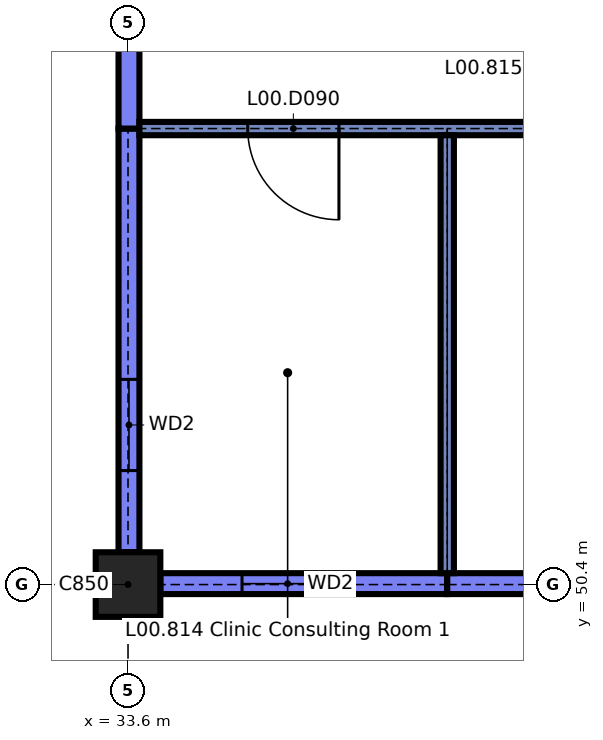
"""IFC4 building model, lengths in metres.
Left out: names, types, materials, properties, quantities, classifications, styles, units other than length and angle.
Written with IfcOpenShell. Run it as: python <this file> out.ifc"""

import sys

from ifc_helpers import new_model, si_unit, direction, frame, frame_2d, origin, origin_2d, place, context, subcontext, project, spatial, rectangle, extrude, element, fill, save


model = new_model("IFC4")
c1 = context("Model", 3, precision=1e-05, world=origin(), true_north=direction((0.0, 1.0)))
c2 = subcontext(c1, "Body", "Model", "MODEL_VIEW")
j1 = project(units=[si_unit("LENGTHUNIT", "METRE"), si_unit("PLANEANGLEUNIT", "RADIAN")], contexts=[c1])
p1 = place(None, origin())
s1 = spatial("IfcSite", under=j1, at=p1, CompositionType="ELEMENT")
p2 = place(p1, origin())
s2 = spatial("IfcBuilding", under=s1, at=p2, CompositionType="ELEMENT")
p3 = place(p2, origin())
s3 = spatial("IfcBuildingStorey", under=s2, at=p3, CompositionType="ELEMENT", Elevation=0.0)
p4 = place(p3, frame((33.6, 50.4, 0.0), z_axis=(0.0, 0.0, 1.0), x_axis=(1.0, 0.0, 0.0)))
e1 = element("IfcColumn", 1, at=p4, inside=s3, PredefinedType="COLUMN", context=c2, shape_type="SweptSolid", body=[
    extrude(rectangle(XDim=0.85, YDim=0.85, at=origin_2d()), origin(), (0.0, 0.0, 1.0), 4.14),
])
p5 = place(p3, frame((34.025, 50.413, 0.0), z_axis=(0.0, 0.0, 1.0), x_axis=(1.0, 0.0, 0.0)))
e2 = element("IfcWall", 2, at=p5, inside=s3, PredefinedType="SOLIDWALL", context=c2, shape_type="SweptSolid", body=[
    extrude(rectangle(XDim=3.775, YDim=0.275, at=frame_2d((1.888, 0.0))), origin(), (0.0, 0.0, 1.0), 3.84),
])
p6 = place(p5, frame((1.075, 0.0, 0.9)))
e3 = element("IfcOpeningElement", 3, at=p6, cuts=e2, PredefinedType="OPENING", context=c2, shape_type="SweptSolid", body=[
    extrude(rectangle(XDim=1.2, YDim=2.1, at=frame_2d((0.6, 1.05))), frame((0.0, 0.147, 0.0), z_axis=(0.0, -1.0, 0.0), x_axis=(1.0, 0.0, 0.0)), (0.0, 0.0, 1.0), 0.295),
])
p7 = place(p3, frame((37.8, 50.413, 0.0), z_axis=(0.0, 0.0, 1.0), x_axis=(1.0, 0.0, 0.0)))
e4 = element("IfcWall", 4, at=p7, inside=s3, PredefinedType="SOLIDWALL", context=c2, shape_type="SweptSolid", body=[
    extrude(rectangle(XDim=3.775, YDim=0.275, at=frame_2d((1.887, 0.0))), origin(), (0.0, 0.0, 1.0), 3.84),
])
p8 = place(p7, frame((1.5, 0.0, 0.9)))
e5 = element("IfcOpeningElement", 5, at=p8, cuts=e4, PredefinedType="OPENING", context=c2, shape_type="SweptSolid", body=[
    extrude(rectangle(XDim=1.2, YDim=2.1, at=frame_2d((0.6, 1.05))), frame((0.0, 0.147, 0.0), z_axis=(0.0, -1.0, 0.0), x_axis=(1.0, 0.0, 0.0)), (0.0, 0.0, 1.0), 0.295),
])
p9 = place(p3, frame((33.613, 50.825, 0.0), z_axis=(0.0, 0.0, 1.0), x_axis=(0.0, 1.0, 0.0)))
e6 = element("IfcWall", 6, at=p9, inside=s3, PredefinedType="SOLIDWALL", context=c2, shape_type="SweptSolid", body=[
    extrude(rectangle(XDim=5.575, YDim=0.275, at=frame_2d((2.788, 0.0))), origin(), (0.0, 0.0, 1.0), 3.84),
])
p10 = place(p9, frame((1.075, 0.0, 0.9)))
e7 = element("IfcOpeningElement", 7, at=p10, cuts=e6, PredefinedType="OPENING", context=c2, shape_type="SweptSolid", body=[
    extrude(rectangle(XDim=1.2, YDim=2.1, at=frame_2d((0.6, 1.05))), frame((0.0, 0.147, 0.0), z_axis=(0.0, -1.0, 0.0), x_axis=(1.0, 0.0, 0.0)), (0.0, 0.0, 1.0), 0.295),
])
p11 = place(p3, frame((33.613, 56.4, 0.0), z_axis=(0.0, 0.0, 1.0), x_axis=(0.0, 1.0, 0.0)))
e8 = element("IfcWall", 8, at=p11, inside=s3, PredefinedType="SOLIDWALL", context=c2, shape_type="SweptSolid", body=[
    extrude(rectangle(XDim=1.975, YDim=0.275, at=frame_2d((0.988, 0.0))), origin(), (0.0, 0.0, 1.0), 3.84),
])
p12 = place(p3, frame((33.75, 56.4, 0.0), z_axis=(0.0, 0.0, 1.0), x_axis=(1.0, 0.0, 0.0)))
e9 = element("IfcWall", 9, at=p12, inside=s3, PredefinedType="PARTITIONING", context=c2, shape_type="SweptSolid", body=[
    extrude(rectangle(XDim=16.65, YDim=0.175, at=frame_2d((8.325, 0.0))), origin(), (0.0, 0.0, 1.0), 4.14),
])
p13 = place(p12, frame((1.425, 0.0, 0.0)))
e10 = element("IfcOpeningElement", 10, at=p13, cuts=e9, PredefinedType="OPENING", context=c2, shape_type="SweptSolid", body=[
    extrude(rectangle(XDim=1.2, YDim=2.1, at=frame_2d((0.6, 1.05))), frame((0.0, 0.097, 0.0), z_axis=(0.0, -1.0, 0.0), x_axis=(1.0, 0.0, 0.0)), (0.0, 0.0, 1.0), 0.195),
])
p14 = place(p12, frame((5.55, 0.0, 0.0)))
e11 = element("IfcOpeningElement", 11, at=p14, cuts=e9, PredefinedType="OPENING", context=c2, shape_type="SweptSolid", body=[
    extrude(rectangle(XDim=1.2, YDim=2.1, at=frame_2d((0.6, 1.05))), frame((0.0, 0.097, 0.0), z_axis=(0.0, -1.0, 0.0), x_axis=(1.0, 0.0, 0.0)), (0.0, 0.0, 1.0), 0.195),
])
p15 = place(p12, frame((9.75, 0.0, 0.0)))
e12 = element("IfcOpeningElement", 12, at=p15, cuts=e9, PredefinedType="OPENING", context=c2, shape_type="SweptSolid", body=[
    extrude(rectangle(XDim=1.2, YDim=2.1, at=frame_2d((0.6, 1.05))), frame((0.0, 0.097, 0.0), z_axis=(0.0, -1.0, 0.0), x_axis=(1.0, 0.0, 0.0)), (0.0, 0.0, 1.0), 0.195),
])
p16 = place(p12, frame((13.95, 0.0, 0.0)))
e13 = element("IfcOpeningElement", 13, at=p16, cuts=e9, PredefinedType="OPENING", context=c2, shape_type="SweptSolid", body=[
    extrude(rectangle(XDim=1.2, YDim=2.1, at=frame_2d((0.6, 1.05))), frame((0.0, 0.097, 0.0), z_axis=(0.0, -1.0, 0.0), x_axis=(1.0, 0.0, 0.0)), (0.0, 0.0, 1.0), 0.195),
])
p17 = place(p3, frame((37.8, 50.55, 0.0), z_axis=(0.0, 0.0, 1.0), x_axis=(0.0, 1.0, 0.0)))
e14 = element("IfcWall", 14, at=p17, inside=s3, PredefinedType="PARTITIONING", context=c2, shape_type="SweptSolid", body=[
    extrude(rectangle(XDim=5.762, YDim=0.175, at=frame_2d((2.881, 0.0))), origin(), (0.0, 0.0, 1.0), 4.14),
])
p18 = place(p6, origin())
e15 = element("IfcWindow", 15, at=p18, inside=s3, PartitioningType="SINGLE_PANEL", PredefinedType="WINDOW", context=c2, shape_type="SweptSolid", body=[
    extrude(rectangle(XDim=1.2, YDim=2.1, at=frame_2d((0.6, 1.05))), frame((0.0, 0.03, 0.0), z_axis=(0.0, -1.0, 0.0), x_axis=(1.0, 0.0, 0.0)), (0.0, 0.0, 1.0), 0.06),
])
fill(e3, e15)
p19 = place(p10, origin())
e16 = element("IfcWindow", 16, at=p19, inside=s3, PartitioningType="SINGLE_PANEL", PredefinedType="WINDOW", context=c2, shape_type="SweptSolid", body=[
    extrude(rectangle(XDim=1.2, YDim=2.1, at=frame_2d((0.6, 1.05))), frame((0.0, 0.03, 0.0), z_axis=(0.0, -1.0, 0.0), x_axis=(1.0, 0.0, 0.0)), (0.0, 0.0, 1.0), 0.06),
])
fill(e7, e16)
p20 = place(p13, origin())
e17 = element("IfcDoor", 17, at=p20, inside=s3, OperationType="SINGLE_SWING_RIGHT", PredefinedType="DOOR", context=c2, shape_type="SweptSolid", body=[
    extrude(rectangle(XDim=1.2, YDim=2.1, at=frame_2d((0.6, 1.05))), frame((0.0, 0.035, 0.0), z_axis=(0.0, -1.0, 0.0), x_axis=(1.0, 0.0, 0.0)), (0.0, 0.0, 1.0), 0.07),
])
fill(e10, e17)
save(model, sys.argv[1])
